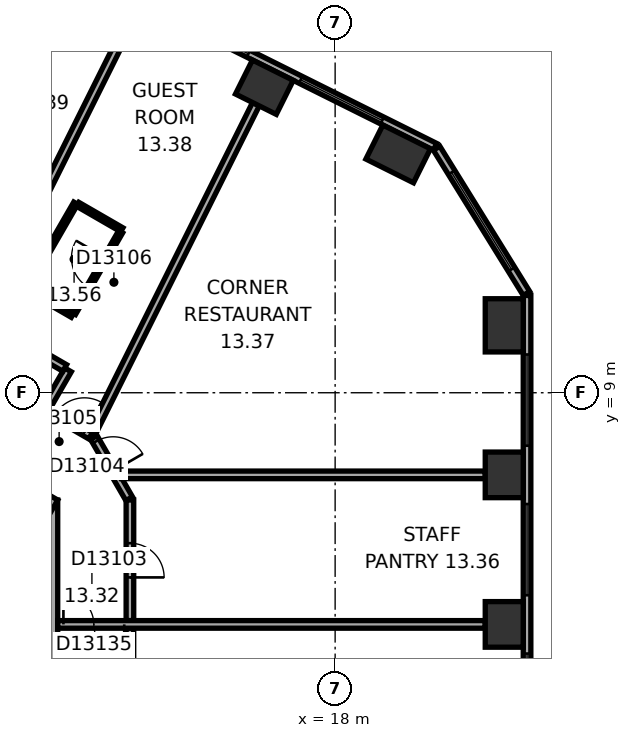
"""IFC4 building model, lengths in metres.
Left out: names, types, materials, properties, quantities, classifications, styles, units other than length and angle.
Written with IfcOpenShell. Run it as: python <this file> out.ifc"""

import sys

from ifc_helpers import new_model, si_unit, direction, frame, frame_2d, origin, origin_2d, place, context, subcontext, project, spatial, rectangle, extrude, element, fill, save


model = new_model("IFC4")
c1 = context("Model", 3, precision=1e-05, world=origin(), true_north=direction((0.0, 1.0)))
c2 = subcontext(c1, "Body", "Model", "MODEL_VIEW")
j1 = project(units=[si_unit("LENGTHUNIT", "METRE"), si_unit("PLANEANGLEUNIT", "RADIAN")], contexts=[c1])
p1 = place(None, origin())
s1 = spatial("IfcSite", under=j1, at=p1, CompositionType="ELEMENT")
p2 = place(p1, origin())
s2 = spatial("IfcBuilding", under=s1, at=p2, CompositionType="ELEMENT")
p3 = place(p2, frame((0.0, 0.0, 63.8)))
s3 = spatial("IfcBuildingStorey", under=s2, at=p3, CompositionType="ELEMENT", Elevation=63.8)
for number, where, z_axis, x_axis in (
    (1, (22.45, 2.905, 0.0), (0.0, 0.0, 1.0), (0.0, 1.0, 0.0)),
    (2, (22.45, 6.839, 0.0), (0.0, 0.0, 1.0), (0.0, 1.0, 0.0)),
):
    element("IfcColumn", number, at=place(p3, frame(where, z_axis=z_axis, x_axis=x_axis)), inside=s3, PredefinedType="COLUMN", context=c2, shape_type="SweptSolid", body=[
        extrude(rectangle(XDim=1.2, YDim=1.0, at=origin_2d()), origin(), (0.0, 0.0, 1.0), 3.3),
    ])
for number, where, z_axis, x_axis in (
    (3, (22.45, 10.774, 0.0), (0.0, 0.0, 1.0), (0.0, 1.0, 0.0)),
    (4, (19.659, 15.284, 0.0), (0.0, 0.0, 1.0), (-0.895, 0.446, 0.0)),
):
    element("IfcColumn", number, at=place(p3, frame(where, z_axis=z_axis, x_axis=x_axis)), inside=s3, PredefinedType="COLUMN", context=c2, shape_type="SweptSolid", body=[
        extrude(rectangle(XDim=1.4, YDim=1.0, at=origin_2d()), origin(), (0.0, 0.0, 1.0), 3.3),
    ])
p4 = place(p3, frame((16.138, 17.04, 0.0), z_axis=(0.0, 0.0, 1.0), x_axis=(-0.894934361602, 0.44619781311, 0.0)))
e5 = element("IfcColumn", 5, at=p4, inside=s3, PredefinedType="COLUMN", context=c2, shape_type="SweptSolid", body=[
    extrude(rectangle(XDim=1.2, YDim=1.0, at=origin_2d()), origin(), (0.0, 0.0, 1.0), 3.3),
])
p5 = place(p3, frame((10.1, -6.177, 0.0), z_axis=(0.0, 0.0, 1.0), x_axis=(0.0, 1.0, 0.0)))
e6 = element("IfcWall", 6, at=p5, inside=s3, PredefinedType="SHEAR", context=c2, shape_type="SweptSolid", body=[
    extrude(rectangle(XDim=12.355, YDim=1.2, at=frame_2d((6.177, 0.0))), origin(), (0.0, 0.0, 1.0), 3.3),
])
p6 = place(p5, frame((6.378, 0.0, 0.0)))
e7 = element("IfcOpeningElement", 7, at=p6, cuts=e6, PredefinedType="OPENING", context=c2, shape_type="SweptSolid", body=[
    extrude(rectangle(XDim=1.5, YDim=2.1, at=frame_2d((0.75, 1.05))), frame((0.0, 0.61, 0.0), z_axis=(0.0, -1.0, 0.0), x_axis=(1.0, 0.0, 0.0)), (0.0, 0.0, 1.0), 1.22),
])
p7 = place(p5, frame((1.828, 0.0, 0.0)))
e8 = element("IfcOpeningElement", 8, at=p7, cuts=e6, PredefinedType="OPENING", context=c2, shape_type="SweptSolid", body=[
    extrude(rectangle(XDim=1.1, YDim=2.1, at=frame_2d((0.55, 1.05))), frame((0.0, 0.61, 0.0), z_axis=(0.0, -1.0, 0.0), x_axis=(1.0, 0.0, 0.0)), (0.0, 0.0, 1.0), 1.22),
])
p8 = place(p5, frame((4.427, 0.0, 0.0)))
e9 = element("IfcOpeningElement", 9, at=p8, cuts=e6, PredefinedType="OPENING", context=c2, shape_type="SweptSolid", body=[
    extrude(rectangle(XDim=1.1, YDim=2.1, at=frame_2d((0.55, 1.05))), frame((0.0, 0.61, 0.0), z_axis=(0.0, -1.0, 0.0), x_axis=(1.0, 0.0, 0.0)), (0.0, 0.0, 1.0), 1.22),
])
p9 = place(p3, frame((10.4, 5.658, 0.0), z_axis=(0.0, 0.0, 1.0), x_axis=(-0.866021384402, 0.500006961711, 0.0)))
e10 = element("IfcWall", 10, at=p9, inside=s3, PredefinedType="SHEAR", context=c2, shape_type="SweptSolid", body=[
    extrude(rectangle(XDim=12.355, YDim=1.2, at=frame_2d((6.178, 0.0))), origin(), (0.0, 0.0, 1.0), 3.3),
])
p10 = place(p9, frame((2.728, 0.0, 0.0)))
e11 = element("IfcOpeningElement", 11, at=p10, cuts=e10, PredefinedType="OPENING", context=c2, shape_type="SweptSolid", body=[
    extrude(rectangle(XDim=1.1, YDim=2.1, at=frame_2d((0.55, 1.05))), frame((0.0, 0.61, 0.0), z_axis=(0.0, -1.0, 0.0), x_axis=(1.0, 0.0, 0.0)), (0.0, 0.0, 1.0), 1.22),
])
p11 = place(p9, frame((5.328, 0.0, 0.0)))
e12 = element("IfcOpeningElement", 12, at=p11, cuts=e10, PredefinedType="OPENING", context=c2, shape_type="SweptSolid", body=[
    extrude(rectangle(XDim=1.1, YDim=2.1, at=frame_2d((0.55, 1.05))), frame((0.0, 0.61, 0.0), z_axis=(0.0, -1.0, 0.0), x_axis=(1.0, 0.0, 0.0)), (0.0, 0.0, 1.0), 1.22),
])
p12 = place(p9, frame((7.928, 0.0, 0.0)))
e13 = element("IfcOpeningElement", 13, at=p12, cuts=e10, PredefinedType="OPENING", context=c2, shape_type="SweptSolid", body=[
    extrude(rectangle(XDim=1.1, YDim=2.1, at=frame_2d((0.55, 1.05))), frame((0.0, 0.61, 0.0), z_axis=(0.0, -1.0, 0.0), x_axis=(1.0, 0.0, 0.0)), (0.0, 0.0, 1.0), 1.22),
])
p13 = place(p3, frame((23.05, -9.687, 0.0), z_axis=(0.0, 0.0, 1.0), x_axis=(0.0, 1.0, 0.0)))
e14 = element("IfcWall", 14, at=p13, inside=s3, PredefinedType="STANDARD", context=c2, shape_type="SweptSolid", body=[
    extrude(rectangle(XDim=21.246, YDim=0.2, at=frame_2d((10.623, 0.0))), origin(), (0.0, 0.0, 1.0), 3.3),
])
p14 = place(p13, frame((1.555, 0.0, 0.8)))
e15 = element("IfcOpeningElement", 15, at=p14, cuts=e14, PredefinedType="OPENING", context=c2, shape_type="SweptSolid", body=[
    extrude(rectangle(XDim=2.4, YDim=1.7, at=frame_2d((1.2, 0.85))), frame((0.0, 0.11, 0.0), z_axis=(0.0, -1.0, 0.0), x_axis=(1.0, 0.0, 0.0)), (0.0, 0.0, 1.0), 0.22),
])
p15 = place(p13, frame((5.489, 0.0, 0.8)))
e16 = element("IfcOpeningElement", 16, at=p15, cuts=e14, PredefinedType="OPENING", context=c2, shape_type="SweptSolid", body=[
    extrude(rectangle(XDim=2.4, YDim=1.7, at=frame_2d((1.2, 0.85))), frame((0.0, 0.11, 0.0), z_axis=(0.0, -1.0, 0.0), x_axis=(1.0, 0.0, 0.0)), (0.0, 0.0, 1.0), 0.22),
])
p16 = place(p13, frame((9.424, 0.0, 0.8)))
e17 = element("IfcOpeningElement", 17, at=p16, cuts=e14, PredefinedType="OPENING", context=c2, shape_type="SweptSolid", body=[
    extrude(rectangle(XDim=2.4, YDim=1.7, at=frame_2d((1.2, 0.85))), frame((0.0, 0.11, 0.0), z_axis=(0.0, -1.0, 0.0), x_axis=(1.0, 0.0, 0.0)), (0.0, 0.0, 1.0), 0.22),
])
p17 = place(p13, frame((13.358, 0.0, 0.8)))
e18 = element("IfcOpeningElement", 18, at=p17, cuts=e14, PredefinedType="OPENING", context=c2, shape_type="SweptSolid", body=[
    extrude(rectangle(XDim=2.4, YDim=1.7, at=frame_2d((1.2, 0.85))), frame((0.0, 0.11, 0.0), z_axis=(0.0, -1.0, 0.0), x_axis=(1.0, 0.0, 0.0)), (0.0, 0.0, 1.0), 0.22),
])
p18 = place(p13, frame((17.293, 0.0, 0.8)))
e19 = element("IfcOpeningElement", 19, at=p18, cuts=e14, PredefinedType="OPENING", context=c2, shape_type="SweptSolid", body=[
    extrude(rectangle(XDim=2.4, YDim=1.7, at=frame_2d((1.2, 0.85))), frame((0.0, 0.11, 0.0), z_axis=(0.0, -1.0, 0.0), x_axis=(1.0, 0.0, 0.0)), (0.0, 0.0, 1.0), 0.22),
])
p19 = place(p3, frame((23.035, 11.612, 0.0), z_axis=(0.0, 0.0, 1.0), x_axis=(-0.526160091227, 0.850385535155, 0.0)))
e20 = element("IfcWall", 20, at=p19, inside=s3, PredefinedType="STANDARD", context=c2, shape_type="SweptSolid", body=[
    extrude(rectangle(XDim=4.494, YDim=0.2, at=frame_2d((2.247, 0.0))), origin(), (0.0, 0.0, 1.0), 3.3),
])
p20 = place(p19, frame((0.747, 0.0, 0.8)))
e21 = element("IfcOpeningElement", 21, at=p20, cuts=e20, PredefinedType="OPENING", context=c2, shape_type="SweptSolid", body=[
    extrude(rectangle(XDim=3.0, YDim=1.7, at=frame_2d((1.5, 0.85))), frame((0.0, 0.11, 0.0), z_axis=(0.0, -1.0, 0.0), x_axis=(1.0, 0.0, 0.0)), (0.0, 0.0, 1.0), 0.22),
])
p21 = place(p3, frame((20.63, 15.47, 0.0), z_axis=(0.0, 0.0, 1.0), x_axis=(-0.894934518609, 0.446197498203, 0.0)))
e22 = element("IfcWall", 22, at=p21, inside=s3, PredefinedType="STANDARD", context=c2, shape_type="SweptSolid", body=[
    extrude(rectangle(XDim=21.246, YDim=0.2, at=frame_2d((10.623, 0.0))), origin(), (0.0, 0.0, 1.0), 3.3),
])
p22 = place(p21, frame((1.553, 0.0, 0.8)))
e23 = element("IfcOpeningElement", 23, at=p22, cuts=e22, PredefinedType="OPENING", context=c2, shape_type="SweptSolid", body=[
    extrude(rectangle(XDim=2.4, YDim=1.7, at=frame_2d((1.2, 0.85))), frame((0.0, 0.11, 0.0), z_axis=(0.0, -1.0, 0.0), x_axis=(1.0, 0.0, 0.0)), (0.0, 0.0, 1.0), 0.22),
])
p23 = place(p21, frame((5.488, 0.0, 0.8)))
e24 = element("IfcOpeningElement", 24, at=p23, cuts=e22, PredefinedType="OPENING", context=c2, shape_type="SweptSolid", body=[
    extrude(rectangle(XDim=2.4, YDim=1.7, at=frame_2d((1.2, 0.85))), frame((0.0, 0.11, 0.0), z_axis=(0.0, -1.0, 0.0), x_axis=(1.0, 0.0, 0.0)), (0.0, 0.0, 1.0), 0.22),
])
p24 = place(p21, frame((9.422, 0.0, 0.8)))
e25 = element("IfcOpeningElement", 25, at=p24, cuts=e22, PredefinedType="OPENING", context=c2, shape_type="SweptSolid", body=[
    extrude(rectangle(XDim=2.4, YDim=1.7, at=frame_2d((1.2, 0.85))), frame((0.0, 0.11, 0.0), z_axis=(0.0, -1.0, 0.0), x_axis=(1.0, 0.0, 0.0)), (0.0, 0.0, 1.0), 0.22),
])
p25 = place(p21, frame((13.357, 0.0, 0.8)))
e26 = element("IfcOpeningElement", 26, at=p25, cuts=e22, PredefinedType="OPENING", context=c2, shape_type="SweptSolid", body=[
    extrude(rectangle(XDim=2.4, YDim=1.7, at=frame_2d((1.2, 0.85))), frame((0.0, 0.11, 0.0), z_axis=(0.0, -1.0, 0.0), x_axis=(1.0, 0.0, 0.0)), (0.0, 0.0, 1.0), 0.22),
])
p26 = place(p21, frame((17.292, 0.0, 0.8)))
e27 = element("IfcOpeningElement", 27, at=p26, cuts=e22, PredefinedType="OPENING", context=c2, shape_type="SweptSolid", body=[
    extrude(rectangle(XDim=2.4, YDim=1.7, at=frame_2d((1.2, 0.85))), frame((0.0, 0.11, 0.0), z_axis=(0.0, -1.0, 0.0), x_axis=(1.0, 0.0, 0.0)), (0.0, 0.0, 1.0), 0.22),
])
p27 = place(p3, frame((9.875, 11.736, 0.0), z_axis=(0.0, 0.0, 1.0), x_axis=(0.499936506574, 0.866062058628, 0.0)))
e28 = element("IfcWall", 28, at=p27, inside=s3, PredefinedType="PARTITIONING", context=c2, shape_type="SweptSolid", body=[
    extrude(rectangle(XDim=2.6, YDim=0.12, at=frame_2d((1.3, 0.0))), origin(), (0.0, 0.0, 1.0), 3.05),
])
p28 = place(p3, frame((10.371, 8.561, 0.0), z_axis=(0.0, 0.0, 1.0), x_axis=(0.499986357472, 0.866033280158, 0.0)))
e29 = element("IfcWall", 29, at=p28, inside=s3, PredefinedType="PARTITIONING", context=c2, shape_type="SweptSolid", body=[
    extrude(rectangle(XDim=1.201, YDim=0.2, at=frame_2d((0.601, 0.0))), origin(), (0.0, 0.0, 1.0), 3.05),
])
p29 = place(p3, frame((10.885, 9.652, 0.0), z_axis=(0.0, 0.0, 1.0), x_axis=(-0.866033868542, 0.499985338323, 0.0)))
e30 = element("IfcWall", 30, at=p29, inside=s3, PredefinedType="PARTITIONING", context=c2, shape_type="SweptSolid", body=[
    extrude(rectangle(XDim=8.602, YDim=0.2, at=frame_2d((4.301, 0.0))), origin(), (0.0, 0.0, 1.0), 3.05),
])
p30 = place(p29, frame((5.302, 0.0, 0.0)))
e31 = element("IfcOpeningElement", 31, at=p30, cuts=e30, PredefinedType="OPENING", context=c2, shape_type="SweptSolid", body=[
    extrude(rectangle(XDim=0.9, YDim=2.1, at=frame_2d((0.45, 1.05))), frame((0.0, 0.11, 0.0), z_axis=(0.0, -1.0, 0.0), x_axis=(1.0, 0.0, 0.0)), (0.0, 0.0, 1.0), 0.22),
])
for number, where, z_axis, x_axis in (
    (32, (11.087, 11.036, 0.0), (0.0, 0.0, 1.0), (-0.866, 0.5, 0.0)),
    (33, (11.226, 13.958, 0.0), (0.0, 0.0, 1.0), (0.866, -0.5, 0.0)),
):
    element("IfcWall", number, at=place(p3, frame(where, z_axis=z_axis, x_axis=x_axis)), inside=s3, PredefinedType="PARTITIONING", context=c2, shape_type="SweptSolid", body=[
        extrude(rectangle(XDim=1.34, YDim=0.12, at=frame_2d((0.67, 0.0))), origin(), (0.0, 0.0, 1.0), 3.05),
    ])
p31 = place(p3, frame((11.566, 7.871, 0.0), z_axis=(0.0, 0.0, 1.0), x_axis=(-0.866004557827, 0.500036104519, 0.0)))
e34 = element("IfcWall", 34, at=p31, inside=s3, PredefinedType="PARTITIONING", context=c2, shape_type="SweptSolid", body=[
    extrude(rectangle(XDim=1.28, YDim=0.2, at=frame_2d((0.64, 0.0))), origin(), (0.0, 0.0, 1.0), 3.05),
])
p32 = place(p31, frame((0.19, 0.0, 0.0)))
e35 = element("IfcOpeningElement", 35, at=p32, cuts=e34, PredefinedType="OPENING", context=c2, shape_type="SweptSolid", body=[
    extrude(rectangle(XDim=0.9, YDim=2.1, at=frame_2d((0.45, 1.05))), frame((0.0, 0.11, 0.0), z_axis=(0.0, -1.0, 0.0), x_axis=(1.0, 0.0, 0.0)), (0.0, 0.0, 1.0), 0.22),
])
p33 = place(p3, frame((12.357, 13.236, 0.0), z_axis=(0.0, 0.0, 1.0), x_axis=(-0.50000366821, -0.866023285932, 0.0)))
e36 = element("IfcWall", 36, at=p33, inside=s3, PredefinedType="PARTITIONING", context=c2, shape_type="SweptSolid", body=[
    extrude(rectangle(XDim=2.48, YDim=0.12, at=frame_2d((1.24, 0.0))), origin(), (0.0, 0.0, 1.0), 3.05),
])
p34 = place(p33, frame((0.79, 0.0, 0.0)))
e37 = element("IfcOpeningElement", 37, at=p34, cuts=e36, PredefinedType="OPENING", context=c2, shape_type="SweptSolid", body=[
    extrude(rectangle(XDim=0.9, YDim=2.1, at=frame_2d((0.45, 1.05))), frame((0.0, 0.07, 0.0), z_axis=(0.0, -1.0, 0.0), x_axis=(1.0, 0.0, 0.0)), (0.0, 0.0, 1.0), 0.14),
])
p35 = place(p3, frame((12.393, 18.348, 0.0), z_axis=(0.0, 0.0, 1.0), x_axis=(-0.446176022699, -0.894945225569, 0.0)))
e38 = element("IfcWall", 38, at=p35, inside=s3, PredefinedType="PARTITIONING", context=c2, shape_type="SweptSolid", body=[
    extrude(rectangle(XDim=8.191, YDim=0.2, at=frame_2d((4.095, 0.0))), origin(), (0.0, 0.0, 1.0), 2.6),
])
p36 = place(p3, frame((12.58, 6.212, 0.0), z_axis=(0.0, 0.0, 1.0), x_axis=(-0.500063286585, 0.865988862174, 0.0)))
e39 = element("IfcWall", 39, at=p36, inside=s3, PredefinedType="PARTITIONING", context=c2, shape_type="SweptSolid", body=[
    extrude(rectangle(XDim=1.86, YDim=0.2, at=frame_2d((0.93, 0.0))), origin(), (0.0, 0.0, 1.0), 3.05),
])
p37 = place(p36, frame((0.842, 0.0, 0.0)))
e40 = element("IfcOpeningElement", 40, at=p37, cuts=e39, PredefinedType="OPENING", context=c2, shape_type="SweptSolid", body=[
    extrude(rectangle(XDim=0.9, YDim=2.1, at=frame_2d((0.45, 1.05))), frame((0.0, 0.11, 0.0), z_axis=(0.0, -1.0, 0.0), x_axis=(1.0, 0.0, 0.0)), (0.0, 0.0, 1.0), 0.22),
])
p38 = place(p3, frame((12.6, 0.201, 0.0), z_axis=(0.0, 0.0, 1.0), x_axis=(0.0, 1.0, 0.0)))
e41 = element("IfcWall", 41, at=p38, inside=s3, PredefinedType="PARTITIONING", context=c2, shape_type="SweptSolid", body=[
    extrude(rectangle(XDim=2.604, YDim=0.2, at=frame_2d((1.302, 0.0))), origin(), (0.0, 0.0, 1.0), 3.05),
])
p39 = place(p38, frame((0.852, 0.0, 0.0)))
e42 = element("IfcOpeningElement", 42, at=p39, cuts=e41, PredefinedType="OPENING", context=c2, shape_type="SweptSolid", body=[
    extrude(rectangle(XDim=0.9, YDim=2.1, at=frame_2d((0.45, 1.05))), frame((0.0, 0.11, 0.0), z_axis=(0.0, -1.0, 0.0), x_axis=(1.0, 0.0, 0.0)), (0.0, 0.0, 1.0), 0.22),
])
p40 = place(p3, frame((12.6, 3.004, 0.0), z_axis=(0.0, 0.0, 1.0), x_axis=(0.0, 1.0, 0.0)))
e43 = element("IfcWall", 43, at=p40, inside=s3, PredefinedType="PARTITIONING", context=c2, shape_type="SweptSolid", body=[
    extrude(rectangle(XDim=3.173, YDim=0.2, at=frame_2d((1.586, 0.0))), origin(), (0.0, 0.0, 1.0), 3.05),
])
p41 = place(p40, frame((1.136, 0.0, 0.0)))
e44 = element("IfcOpeningElement", 44, at=p41, cuts=e43, PredefinedType="OPENING", context=c2, shape_type="SweptSolid", body=[
    extrude(rectangle(XDim=0.9, YDim=2.1, at=frame_2d((0.45, 1.05))), frame((0.0, 0.11, 0.0), z_axis=(0.0, -1.0, 0.0), x_axis=(1.0, 0.0, 0.0)), (0.0, 0.0, 1.0), 0.22),
])
p42 = place(p3, frame((15.915, 16.592, 0.0), z_axis=(0.0, 0.0, 1.0), x_axis=(-0.446199736347, -0.894933402709, 0.0)))
e45 = element("IfcWall", 45, at=p42, inside=s3, PredefinedType="PARTITIONING", context=c2, shape_type="SweptSolid", body=[
    extrude(rectangle(XDim=9.635, YDim=0.2, at=frame_2d((4.817, 0.0))), origin(), (0.0, 0.0, 1.0), 3.05),
])
p43 = place(p3, frame((21.95, 2.905, 0.0), z_axis=(0.0, 0.0, 1.0), x_axis=(-1.0, 0.0, 0.0)))
e46 = element("IfcWall", 46, at=p43, inside=s3, PredefinedType="PARTITIONING", context=c2, shape_type="SweptSolid", body=[
    extrude(rectangle(XDim=11.25, YDim=0.2, at=frame_2d((5.625, 0.0))), origin(), (0.0, 0.0, 1.0), 3.05),
])
p44 = place(p43, frame((9.5, 0.0, 0.0)))
e47 = element("IfcOpeningElement", 47, at=p44, cuts=e46, PredefinedType="OPENING", context=c2, shape_type="SweptSolid", body=[
    extrude(rectangle(XDim=1.6, YDim=2.1, at=frame_2d((0.8, 1.05))), frame((0.0, 0.11, 0.0), z_axis=(0.0, -1.0, 0.0), x_axis=(1.0, 0.0, 0.0)), (0.0, 0.0, 1.0), 0.22),
])
p45 = place(p3, frame((21.95, 6.839, 0.0), z_axis=(0.0, 0.0, 1.0), x_axis=(-1.0, 0.0, 0.0)))
e48 = element("IfcWall", 48, at=p45, inside=s3, PredefinedType="PARTITIONING", context=c2, shape_type="SweptSolid", body=[
    extrude(rectangle(XDim=9.572, YDim=0.2, at=frame_2d((4.786, 0.0))), origin(), (0.0, 0.0, 1.0), 3.05),
])
p46 = place(p16, origin())
e49 = element("IfcWindow", 49, at=p46, inside=s3, PartitioningType="SINGLE_PANEL", PredefinedType="WINDOW", context=c2, shape_type="SweptSolid", body=[
    extrude(rectangle(XDim=2.4, YDim=1.7, at=frame_2d((1.2, 0.85))), frame((0.0, 0.03, 0.0), z_axis=(0.0, -1.0, 0.0), x_axis=(1.0, 0.0, 0.0)), (0.0, 0.0, 1.0), 0.06),
])
fill(e17, e49)
p47 = place(p17, origin())
e50 = element("IfcWindow", 50, at=p47, inside=s3, PartitioningType="SINGLE_PANEL", PredefinedType="WINDOW", context=c2, shape_type="SweptSolid", body=[
    extrude(rectangle(XDim=2.4, YDim=1.7, at=frame_2d((1.2, 0.85))), frame((0.0, 0.03, 0.0), z_axis=(0.0, -1.0, 0.0), x_axis=(1.0, 0.0, 0.0)), (0.0, 0.0, 1.0), 0.06),
])
fill(e18, e50)
p48 = place(p18, origin())
e51 = element("IfcWindow", 51, at=p48, inside=s3, PartitioningType="SINGLE_PANEL", PredefinedType="WINDOW", context=c2, shape_type="SweptSolid", body=[
    extrude(rectangle(XDim=2.4, YDim=1.7, at=frame_2d((1.2, 0.85))), frame((0.0, 0.03, 0.0), z_axis=(0.0, -1.0, 0.0), x_axis=(1.0, 0.0, 0.0)), (0.0, 0.0, 1.0), 0.06),
])
fill(e19, e51)
p49 = place(p20, origin())
e52 = element("IfcWindow", 52, at=p49, inside=s3, PartitioningType="SINGLE_PANEL", PredefinedType="WINDOW", context=c2, shape_type="SweptSolid", body=[
    extrude(rectangle(XDim=3.0, YDim=1.7, at=frame_2d((1.5, 0.85))), frame((0.0, 0.03, 0.0), z_axis=(0.0, -1.0, 0.0), x_axis=(1.0, 0.0, 0.0)), (0.0, 0.0, 1.0), 0.06),
])
fill(e21, e52)
p50 = place(p22, origin())
e53 = element("IfcWindow", 53, at=p50, inside=s3, PartitioningType="SINGLE_PANEL", PredefinedType="WINDOW", context=c2, shape_type="SweptSolid", body=[
    extrude(rectangle(XDim=2.4, YDim=1.7, at=frame_2d((1.2, 0.85))), frame((0.0, 0.03, 0.0), z_axis=(0.0, -1.0, 0.0), x_axis=(1.0, 0.0, 0.0)), (0.0, 0.0, 1.0), 0.06),
])
fill(e23, e53)
p51 = place(p23, origin())
e54 = element("IfcWindow", 54, at=p51, inside=s3, PartitioningType="SINGLE_PANEL", PredefinedType="WINDOW", context=c2, shape_type="SweptSolid", body=[
    extrude(rectangle(XDim=2.4, YDim=1.7, at=frame_2d((1.2, 0.85))), frame((0.0, 0.03, 0.0), z_axis=(0.0, -1.0, 0.0), x_axis=(1.0, 0.0, 0.0)), (0.0, 0.0, 1.0), 0.06),
])
fill(e24, e54)
p52 = place(p41, origin())
e55 = element("IfcDoor", 55, at=p52, inside=s3, OperationType="SINGLE_SWING_LEFT", PredefinedType="DOOR", context=c2, shape_type="SweptSolid", body=[
    extrude(rectangle(XDim=0.9, YDim=2.1, at=frame_2d((0.45, 1.05))), frame((0.0, 0.025, 0.0), z_axis=(0.0, -1.0, 0.0), x_axis=(1.0, 0.0, 0.0)), (0.0, 0.0, 1.0), 0.05),
])
fill(e44, e55)
p53 = place(p37, origin())
e56 = element("IfcDoor", 56, at=p53, inside=s3, OperationType="SINGLE_SWING_LEFT", PredefinedType="DOOR", context=c2, shape_type="SweptSolid", body=[
    extrude(rectangle(XDim=0.9, YDim=2.1, at=frame_2d((0.45, 1.05))), frame((0.0, 0.025, 0.0), z_axis=(0.0, -1.0, 0.0), x_axis=(1.0, 0.0, 0.0)), (0.0, 0.0, 1.0), 0.05),
])
fill(e40, e56)
p54 = place(p32, origin())
e57 = element("IfcDoor", 57, at=p54, inside=s3, OperationType="SINGLE_SWING_LEFT", PredefinedType="DOOR", context=c2, shape_type="SweptSolid", body=[
    extrude(rectangle(XDim=0.9, YDim=2.1, at=frame_2d((0.45, 1.05))), frame((0.0, 0.025, 0.0), z_axis=(0.0, -1.0, 0.0), x_axis=(1.0, 0.0, 0.0)), (0.0, 0.0, 1.0), 0.05),
])
fill(e35, e57)
p55 = place(p34, origin())
e58 = element("IfcDoor", 58, at=p55, inside=s3, OperationType="SINGLE_SWING_LEFT", PredefinedType="DOOR", context=c2, shape_type="SweptSolid", body=[
    extrude(rectangle(XDim=0.9, YDim=2.1, at=frame_2d((0.45, 1.05))), frame((0.0, 0.025, 0.0), z_axis=(0.0, -1.0, 0.0), x_axis=(1.0, 0.0, 0.0)), (0.0, 0.0, 1.0), 0.05),
])
fill(e37, e58)
p56 = place(p44, origin())
e59 = element("IfcDoor", 59, at=p56, inside=s3, OperationType="DOUBLE_DOOR_SINGLE_SWING", PredefinedType="DOOR", context=c2, shape_type="SweptSolid", body=[
    extrude(rectangle(XDim=1.6, YDim=2.1, at=frame_2d((0.8, 1.05))), frame((0.0, 0.025, 0.0), z_axis=(0.0, -1.0, 0.0), x_axis=(1.0, 0.0, 0.0)), (0.0, 0.0, 1.0), 0.05),
])
fill(e47, e59)
save(model, sys.argv[1])
